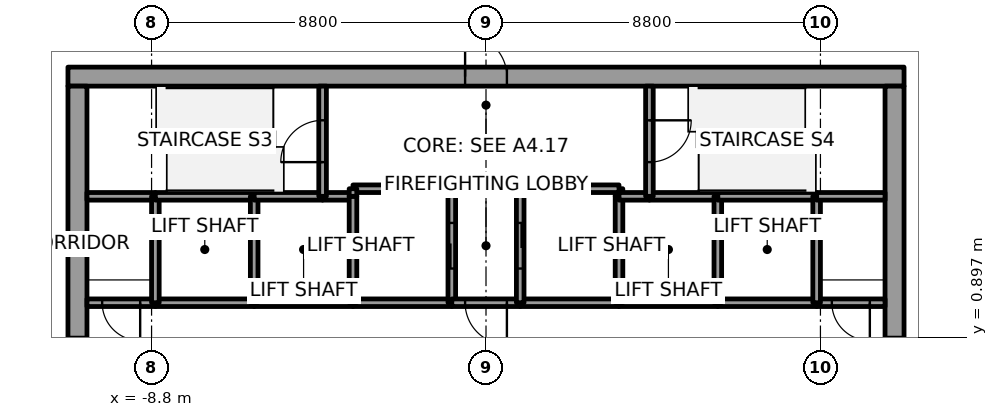
"""IFC4 building model, lengths in metres.
Left out: names, types, materials, properties, quantities, classifications, styles, units other than length and angle.
Written with IfcOpenShell. Run it as: python <this file> out.ifc"""

import sys

from ifc_helpers import new_model, si_unit, direction, frame, frame_2d, origin, place, context, subcontext, project, spatial, rectangle, extrude, element, fill, save


model = new_model("IFC4")
c1 = context("Model", 3, precision=1e-05, world=origin(), true_north=direction((0.0, 1.0)))
c2 = subcontext(c1, "Body", "Model", "MODEL_VIEW")
j1 = project(units=[si_unit("LENGTHUNIT", "METRE"), si_unit("PLANEANGLEUNIT", "RADIAN")], contexts=[c1])
p1 = place(None, origin())
s1 = spatial("IfcSite", under=j1, at=p1, CompositionType="ELEMENT")
p2 = place(p1, origin())
s2 = spatial("IfcBuilding", under=s1, at=p2, CompositionType="ELEMENT")
p3 = place(p2, frame((0.0, 0.0, 77.6)))
s3 = spatial("IfcBuildingStorey", under=s2, at=p3, CompositionType="ELEMENT", Elevation=77.6)
p4 = place(p3, frame((-11.0, 7.75, 0.0), z_axis=(0.0, 0.0, 1.0), x_axis=(1.0, 0.0, 0.0)))
e1 = element("IfcWall", 1, at=p4, inside=s3, PredefinedType="SHEAR", context=c2, shape_type="SweptSolid", body=[
    extrude(rectangle(XDim=22.0, YDim=0.5, at=frame_2d((11.0, 0.0))), origin(), (0.0, 0.0, 1.0), 3.7),
])
p5 = place(p4, frame((10.45, 0.0, 0.0)))
e2 = element("IfcOpeningElement", 2, at=p5, cuts=e1, PredefinedType="OPENING", context=c2, shape_type="SweptSolid", body=[
    extrude(rectangle(XDim=1.1, YDim=2.1, at=frame_2d((0.55, 1.05))), frame((0.0, 0.25, 0.0), z_axis=(0.0, -1.0, 0.0), x_axis=(1.0, 0.0, 0.0)), (0.0, 0.0, 1.0), 0.5),
])
p6 = place(p3, frame((-10.75, -7.5, 0.0), z_axis=(0.0, 0.0, 1.0), x_axis=(0.0, 1.0, 0.0)))
e3 = element("IfcWall", 3, at=p6, inside=s3, PredefinedType="SHEAR", context=c2, shape_type="SweptSolid", body=[
    extrude(rectangle(XDim=15.0, YDim=0.5, at=frame_2d((7.5, 0.0))), origin(), (0.0, 0.0, 1.0), 3.7),
])
p7 = place(p6, frame((6.6, 0.0, 0.0)))
e4 = element("IfcOpeningElement", 4, at=p7, cuts=e3, PredefinedType="OPENING", context=c2, shape_type="SweptSolid", body=[
    extrude(rectangle(XDim=1.8, YDim=2.1, at=frame_2d((0.9, 1.05))), frame((0.0, 0.25, 0.0), z_axis=(0.0, -1.0, 0.0), x_axis=(1.0, 0.0, 0.0)), (0.0, 0.0, 1.0), 0.5),
])
p8 = place(p3, frame((10.75, -7.5, 0.0), z_axis=(0.0, 0.0, 1.0), x_axis=(0.0, 1.0, 0.0)))
e5 = element("IfcWall", 5, at=p8, inside=s3, PredefinedType="SHEAR", context=c2, shape_type="SweptSolid", body=[
    extrude(rectangle(XDim=15.0, YDim=0.5, at=frame_2d((7.5, 0.0))), origin(), (0.0, 0.0, 1.0), 3.7),
])
p9 = place(p8, frame((6.6, 0.0, 0.0)))
e6 = element("IfcOpeningElement", 6, at=p9, cuts=e5, PredefinedType="OPENING", context=c2, shape_type="SweptSolid", body=[
    extrude(rectangle(XDim=1.8, YDim=2.1, at=frame_2d((0.9, 1.05))), frame((0.0, 0.25, 0.0), z_axis=(0.0, -1.0, 0.0), x_axis=(1.0, 0.0, 0.0)), (0.0, 0.0, 1.0), 0.5),
])
p10 = place(p3, frame((-8.7, 1.8, 0.0), z_axis=(0.0, 0.0, 1.0), x_axis=(-1.0, 0.0, 0.0)))
e7 = element("IfcWall", 7, at=p10, inside=s3, PredefinedType="SOLIDWALL", context=c2, shape_type="SweptSolid", body=[
    extrude(rectangle(XDim=1.8, YDim=0.2, at=frame_2d((0.9, 0.0))), origin(), (0.0, 0.0, 1.0), 3.55),
])
p11 = place(p10, frame((0.4, 0.0, 0.0)))
e8 = element("IfcOpeningElement", 8, at=p11, cuts=e7, PredefinedType="OPENING", context=c2, shape_type="SweptSolid", body=[
    extrude(rectangle(XDim=1.0, YDim=2.1, at=frame_2d((0.5, 1.05))), frame((0.0, 0.1, 0.0), z_axis=(0.0, -1.0, 0.0), x_axis=(1.0, 0.0, 0.0)), (0.0, 0.0, 1.0), 0.2),
])
p12 = place(p3, frame((-8.7, 4.6, 0.0), z_axis=(0.0, 0.0, 1.0), x_axis=(-1.0, 0.0, 0.0)))
e9 = element("IfcWall", 9, at=p12, inside=s3, PredefinedType="SOLIDWALL", context=c2, shape_type="SweptSolid", body=[
    extrude(rectangle(XDim=1.8, YDim=0.2, at=frame_2d((0.9, 0.0))), origin(), (0.0, 0.0, 1.0), 3.55),
])
p13 = place(p3, frame((-6.1, 1.8, 0.0), z_axis=(0.0, 0.0, 1.0), x_axis=(-1.0, 0.0, 0.0)))
e10 = element("IfcWall", 10, at=p13, inside=s3, PredefinedType="SOLIDWALL", context=c2, shape_type="SweptSolid", body=[
    extrude(rectangle(XDim=2.6, YDim=0.2, at=frame_2d((1.3, 0.0))), origin(), (0.0, 0.0, 1.0), 3.55),
])
p14 = place(p3, frame((-8.7, 1.8, 0.0), z_axis=(0.0, 0.0, 1.0), x_axis=(0.0, 1.0, 0.0)))
e11 = element("IfcWall", 11, at=p14, inside=s3, PredefinedType="SOLIDWALL", context=c2, shape_type="SweptSolid", body=[
    extrude(rectangle(XDim=2.8, YDim=0.2, at=frame_2d((1.4, 0.0))), origin(), (0.0, 0.0, 1.0), 3.55),
])
p15 = place(p3, frame((-6.1, 4.6, 0.0), z_axis=(0.0, 0.0, 1.0), x_axis=(-1.0, 0.0, 0.0)))
e12 = element("IfcWall", 12, at=p15, inside=s3, PredefinedType="SOLIDWALL", context=c2, shape_type="SweptSolid", body=[
    extrude(rectangle(XDim=2.6, YDim=0.2, at=frame_2d((1.3, 0.0))), origin(), (0.0, 0.0, 1.0), 3.55),
])
p16 = place(p3, frame((-3.5, 1.8, 0.0), z_axis=(0.0, 0.0, 1.0), x_axis=(-1.0, 0.0, 0.0)))
e13 = element("IfcWall", 13, at=p16, inside=s3, PredefinedType="SOLIDWALL", context=c2, shape_type="SweptSolid", body=[
    extrude(rectangle(XDim=2.6, YDim=0.2, at=frame_2d((1.3, 0.0))), origin(), (0.0, 0.0, 1.0), 3.55),
])
p17 = place(p3, frame((-6.1, 1.8, 0.0), z_axis=(0.0, 0.0, 1.0), x_axis=(0.0, 1.0, 0.0)))
e14 = element("IfcWall", 14, at=p17, inside=s3, PredefinedType="SOLIDWALL", context=c2, shape_type="SweptSolid", body=[
    extrude(rectangle(XDim=2.8, YDim=0.2, at=frame_2d((1.4, 0.0))), origin(), (0.0, 0.0, 1.0), 3.55),
])
p18 = place(p3, frame((-4.3, 4.6, 0.0), z_axis=(0.0, 0.0, 1.0), x_axis=(-1.0, 0.0, 0.0)))
e15 = element("IfcWall", 15, at=p18, inside=s3, PredefinedType="SOLIDWALL", context=c2, shape_type="SweptSolid", body=[
    extrude(rectangle(XDim=1.8, YDim=0.2, at=frame_2d((0.9, 0.0))), origin(), (0.0, 0.0, 1.0), 3.55),
])
p19 = place(p3, frame((-3.5, 4.6, 0.0), z_axis=(0.0, 0.0, 1.0), x_axis=(-1.0, 0.0, 0.0)))
e16 = element("IfcWall", 16, at=p19, inside=s3, PredefinedType="SOLIDWALL", context=c2, shape_type="SweptSolid", body=[
    extrude(rectangle(XDim=0.8, YDim=0.2, at=frame_2d((0.4, 0.0))), origin(), (0.0, 0.0, 1.0), 3.55),
])
p20 = place(p3, frame((-4.3, 4.6, 0.0), z_axis=(0.0, 0.0, 1.0), x_axis=(0.0, 1.0, 0.0)))
e17 = element("IfcWall", 17, at=p20, inside=s3, PredefinedType="SOLIDWALL", context=c2, shape_type="SweptSolid", body=[
    extrude(rectangle(XDim=2.9, YDim=0.2, at=frame_2d((1.45, 0.0))), origin(), (0.0, 0.0, 1.0), 3.55),
])
p21 = place(p20, frame((0.9, 0.0, 0.0)))
e18 = element("IfcOpeningElement", 18, at=p21, cuts=e17, PredefinedType="OPENING", context=c2, shape_type="SweptSolid", body=[
    extrude(rectangle(XDim=1.1, YDim=2.1, at=frame_2d((0.55, 1.05))), frame((0.0, 0.1, 0.0), z_axis=(0.0, -1.0, 0.0), x_axis=(1.0, 0.0, 0.0)), (0.0, 0.0, 1.0), 0.2),
])
p22 = place(p3, frame((-0.9, 1.8, 0.0), z_axis=(0.0, 0.0, 1.0), x_axis=(-1.0, 0.0, 0.0)))
e19 = element("IfcWall", 19, at=p22, inside=s3, PredefinedType="SOLIDWALL", context=c2, shape_type="SweptSolid", body=[
    extrude(rectangle(XDim=2.6, YDim=0.2, at=frame_2d((1.3, 0.0))), origin(), (0.0, 0.0, 1.0), 3.55),
])
p23 = place(p3, frame((-3.5, 4.6, 0.0), z_axis=(0.0, 0.0, 1.0), x_axis=(0.0, -1.0, 0.0)))
e20 = element("IfcWall", 20, at=p23, inside=s3, PredefinedType="SOLIDWALL", context=c2, shape_type="SweptSolid", body=[
    extrude(rectangle(XDim=2.8, YDim=0.2, at=frame_2d((1.4, 0.0))), origin(), (0.0, 0.0, 1.0), 3.55),
])
p24 = place(p3, frame((-0.9, 1.8, 0.0), z_axis=(0.0, 0.0, 1.0), x_axis=(0.0, 1.0, 0.0)))
e21 = element("IfcWall", 21, at=p24, inside=s3, PredefinedType="SOLIDWALL", context=c2, shape_type="SweptSolid", body=[
    extrude(rectangle(XDim=3.0, YDim=0.2, at=frame_2d((1.5, 0.0))), origin(), (0.0, 0.0, 1.0), 3.55),
])
p25 = place(p24, frame((0.9, 0.0, 0.0)))
e22 = element("IfcOpeningElement", 22, at=p25, cuts=e21, PredefinedType="OPENING", context=c2, shape_type="SweptSolid", body=[
    extrude(rectangle(XDim=1.2, YDim=2.1, at=frame_2d((0.6, 1.05))), frame((0.0, 0.1, 0.0), z_axis=(0.0, -1.0, 0.0), x_axis=(1.0, 0.0, 0.0)), (0.0, 0.0, 1.0), 0.2),
])
p26 = place(p3, frame((-0.9, 4.8, 0.0), z_axis=(0.0, 0.0, 1.0), x_axis=(-1.0, 0.0, 0.0)))
e23 = element("IfcWall", 23, at=p26, inside=s3, PredefinedType="SOLIDWALL", context=c2, shape_type="SweptSolid", body=[
    extrude(rectangle(XDim=2.6, YDim=0.2, at=frame_2d((1.3, 0.0))), origin(), (0.0, 0.0, 1.0), 3.55),
])
p27 = place(p3, frame((-3.5, 4.8, 0.0), z_axis=(0.0, 0.0, 1.0), x_axis=(0.0, -1.0, 0.0)))
e24 = element("IfcWall", 24, at=p27, inside=s3, PredefinedType="SOLIDWALL", context=c2, shape_type="SweptSolid", body=[
    extrude(rectangle(XDim=0.2, YDim=0.2, at=frame_2d((0.1, 0.0))), origin(), (0.0, 0.0, 1.0), 3.55),
])
p28 = place(p3, frame((0.9, 1.8, 0.0), z_axis=(0.0, 0.0, 1.0), x_axis=(-1.0, 0.0, 0.0)))
e25 = element("IfcWall", 25, at=p28, inside=s3, PredefinedType="SOLIDWALL", context=c2, shape_type="SweptSolid", body=[
    extrude(rectangle(XDim=1.8, YDim=0.2, at=frame_2d((0.9, 0.0))), origin(), (0.0, 0.0, 1.0), 3.55),
])
p29 = place(p28, frame((0.35, 0.0, 0.0)))
e26 = element("IfcOpeningElement", 26, at=p29, cuts=e25, PredefinedType="OPENING", context=c2, shape_type="SweptSolid", body=[
    extrude(rectangle(XDim=1.1, YDim=2.1, at=frame_2d((0.55, 1.05))), frame((0.0, 0.1, 0.0), z_axis=(0.0, -1.0, 0.0), x_axis=(1.0, 0.0, 0.0)), (0.0, 0.0, 1.0), 0.2),
])
p30 = place(p3, frame((3.5, 1.8, 0.0), z_axis=(0.0, 0.0, 1.0), x_axis=(-1.0, 0.0, 0.0)))
e27 = element("IfcWall", 27, at=p30, inside=s3, PredefinedType="SOLIDWALL", context=c2, shape_type="SweptSolid", body=[
    extrude(rectangle(XDim=2.6, YDim=0.2, at=frame_2d((1.3, 0.0))), origin(), (0.0, 0.0, 1.0), 3.55),
])
p31 = place(p3, frame((3.5, 4.6, 0.0), z_axis=(0.0, 0.0, 1.0), x_axis=(0.0, 1.0, 0.0)))
e28 = element("IfcWall", 28, at=p31, inside=s3, PredefinedType="SOLIDWALL", context=c2, shape_type="SweptSolid", body=[
    extrude(rectangle(XDim=0.2, YDim=0.2, at=frame_2d((0.1, 0.0))), origin(), (0.0, 0.0, 1.0), 3.55),
])
p32 = place(p3, frame((3.5, 4.8, 0.0), z_axis=(0.0, 0.0, 1.0), x_axis=(-1.0, 0.0, 0.0)))
e29 = element("IfcWall", 29, at=p32, inside=s3, PredefinedType="SOLIDWALL", context=c2, shape_type="SweptSolid", body=[
    extrude(rectangle(XDim=2.6, YDim=0.2, at=frame_2d((1.3, 0.0))), origin(), (0.0, 0.0, 1.0), 3.55),
])
p33 = place(p3, frame((0.9, 4.8, 0.0), z_axis=(0.0, 0.0, 1.0), x_axis=(0.0, -1.0, 0.0)))
e30 = element("IfcWall", 30, at=p33, inside=s3, PredefinedType="SOLIDWALL", context=c2, shape_type="SweptSolid", body=[
    extrude(rectangle(XDim=3.0, YDim=0.2, at=frame_2d((1.5, 0.0))), origin(), (0.0, 0.0, 1.0), 3.55),
])
p34 = place(p33, frame((0.9, 0.0, 0.0)))
e31 = element("IfcOpeningElement", 31, at=p34, cuts=e30, PredefinedType="OPENING", context=c2, shape_type="SweptSolid", body=[
    extrude(rectangle(XDim=1.2, YDim=2.1, at=frame_2d((0.6, 1.05))), frame((0.0, 0.1, 0.0), z_axis=(0.0, -1.0, 0.0), x_axis=(1.0, 0.0, 0.0)), (0.0, 0.0, 1.0), 0.2),
])
p35 = place(p3, frame((6.1, 1.8, 0.0), z_axis=(0.0, 0.0, 1.0), x_axis=(-1.0, 0.0, 0.0)))
e32 = element("IfcWall", 32, at=p35, inside=s3, PredefinedType="SOLIDWALL", context=c2, shape_type="SweptSolid", body=[
    extrude(rectangle(XDim=2.6, YDim=0.2, at=frame_2d((1.3, 0.0))), origin(), (0.0, 0.0, 1.0), 3.55),
])
p36 = place(p3, frame((3.5, 1.8, 0.0), z_axis=(0.0, 0.0, 1.0), x_axis=(0.0, 1.0, 0.0)))
e33 = element("IfcWall", 33, at=p36, inside=s3, PredefinedType="SOLIDWALL", context=c2, shape_type="SweptSolid", body=[
    extrude(rectangle(XDim=2.8, YDim=0.2, at=frame_2d((1.4, 0.0))), origin(), (0.0, 0.0, 1.0), 3.55),
])
p37 = place(p3, frame((4.3, 4.6, 0.0), z_axis=(0.0, 0.0, 1.0), x_axis=(-1.0, 0.0, 0.0)))
e34 = element("IfcWall", 34, at=p37, inside=s3, PredefinedType="SOLIDWALL", context=c2, shape_type="SweptSolid", body=[
    extrude(rectangle(XDim=0.8, YDim=0.2, at=frame_2d((0.4, 0.0))), origin(), (0.0, 0.0, 1.0), 3.55),
])
p38 = place(p3, frame((6.1, 4.6, 0.0), z_axis=(0.0, 0.0, 1.0), x_axis=(-1.0, 0.0, 0.0)))
e35 = element("IfcWall", 35, at=p38, inside=s3, PredefinedType="SOLIDWALL", context=c2, shape_type="SweptSolid", body=[
    extrude(rectangle(XDim=1.8, YDim=0.2, at=frame_2d((0.9, 0.0))), origin(), (0.0, 0.0, 1.0), 3.55),
])
p39 = place(p3, frame((4.3, 7.5, 0.0), z_axis=(0.0, 0.0, 1.0), x_axis=(0.0, -1.0, 0.0)))
e36 = element("IfcWall", 36, at=p39, inside=s3, PredefinedType="SOLIDWALL", context=c2, shape_type="SweptSolid", body=[
    extrude(rectangle(XDim=2.9, YDim=0.2, at=frame_2d((1.45, 0.0))), origin(), (0.0, 0.0, 1.0), 3.55),
])
p40 = place(p39, frame((0.9, 0.0, 0.0)))
e37 = element("IfcOpeningElement", 37, at=p40, cuts=e36, PredefinedType="OPENING", context=c2, shape_type="SweptSolid", body=[
    extrude(rectangle(XDim=1.1, YDim=2.1, at=frame_2d((0.55, 1.05))), frame((0.0, 0.1, 0.0), z_axis=(0.0, -1.0, 0.0), x_axis=(1.0, 0.0, 0.0)), (0.0, 0.0, 1.0), 0.2),
])
p41 = place(p3, frame((8.7, 1.8, 0.0), z_axis=(0.0, 0.0, 1.0), x_axis=(-1.0, 0.0, 0.0)))
e38 = element("IfcWall", 38, at=p41, inside=s3, PredefinedType="SOLIDWALL", context=c2, shape_type="SweptSolid", body=[
    extrude(rectangle(XDim=2.6, YDim=0.2, at=frame_2d((1.3, 0.0))), origin(), (0.0, 0.0, 1.0), 3.55),
])
p42 = place(p3, frame((6.1, 1.8, 0.0), z_axis=(0.0, 0.0, 1.0), x_axis=(0.0, 1.0, 0.0)))
e39 = element("IfcWall", 39, at=p42, inside=s3, PredefinedType="SOLIDWALL", context=c2, shape_type="SweptSolid", body=[
    extrude(rectangle(XDim=2.8, YDim=0.2, at=frame_2d((1.4, 0.0))), origin(), (0.0, 0.0, 1.0), 3.55),
])
p43 = place(p3, frame((8.7, 4.6, 0.0), z_axis=(0.0, 0.0, 1.0), x_axis=(-1.0, 0.0, 0.0)))
e40 = element("IfcWall", 40, at=p43, inside=s3, PredefinedType="SOLIDWALL", context=c2, shape_type="SweptSolid", body=[
    extrude(rectangle(XDim=2.6, YDim=0.2, at=frame_2d((1.3, 0.0))), origin(), (0.0, 0.0, 1.0), 3.55),
])
p44 = place(p3, frame((10.5, 1.8, 0.0), z_axis=(0.0, 0.0, 1.0), x_axis=(-1.0, 0.0, 0.0)))
e41 = element("IfcWall", 41, at=p44, inside=s3, PredefinedType="SOLIDWALL", context=c2, shape_type="SweptSolid", body=[
    extrude(rectangle(XDim=1.8, YDim=0.2, at=frame_2d((0.9, 0.0))), origin(), (0.0, 0.0, 1.0), 3.55),
])
p45 = place(p44, frame((0.4, 0.0, 0.0)))
e42 = element("IfcOpeningElement", 42, at=p45, cuts=e41, PredefinedType="OPENING", context=c2, shape_type="SweptSolid", body=[
    extrude(rectangle(XDim=1.0, YDim=2.1, at=frame_2d((0.5, 1.05))), frame((0.0, 0.1, 0.0), z_axis=(0.0, -1.0, 0.0), x_axis=(1.0, 0.0, 0.0)), (0.0, 0.0, 1.0), 0.2),
])
p46 = place(p3, frame((8.7, 4.6, 0.0), z_axis=(0.0, 0.0, 1.0), x_axis=(0.0, -1.0, 0.0)))
e43 = element("IfcWall", 43, at=p46, inside=s3, PredefinedType="SOLIDWALL", context=c2, shape_type="SweptSolid", body=[
    extrude(rectangle(XDim=2.8, YDim=0.2, at=frame_2d((1.4, 0.0))), origin(), (0.0, 0.0, 1.0), 3.55),
])
p47 = place(p3, frame((10.5, 4.6, 0.0), z_axis=(0.0, 0.0, 1.0), x_axis=(-1.0, 0.0, 0.0)))
e44 = element("IfcWall", 44, at=p47, inside=s3, PredefinedType="SOLIDWALL", context=c2, shape_type="SweptSolid", body=[
    extrude(rectangle(XDim=1.8, YDim=0.2, at=frame_2d((0.9, 0.0))), origin(), (0.0, 0.0, 1.0), 3.55),
])
p48 = place(p25, origin())
e45 = element("IfcDoor", 45, at=p48, inside=s3, OperationType="SLIDING_TO_LEFT", PredefinedType="DOOR", context=c2, shape_type="SweptSolid", body=[
    extrude(rectangle(XDim=1.2, YDim=2.1, at=frame_2d((0.6, 1.05))), frame((0.0, 0.025, 0.0), z_axis=(0.0, -1.0, 0.0), x_axis=(1.0, 0.0, 0.0)), (0.0, 0.0, 1.0), 0.05),
])
fill(e22, e45)
p49 = place(p34, origin())
e46 = element("IfcDoor", 46, at=p49, inside=s3, OperationType="SLIDING_TO_LEFT", PredefinedType="DOOR", context=c2, shape_type="SweptSolid", body=[
    extrude(rectangle(XDim=1.2, YDim=2.1, at=frame_2d((0.6, 1.05))), frame((0.0, 0.025, 0.0), z_axis=(0.0, -1.0, 0.0), x_axis=(1.0, 0.0, 0.0)), (0.0, 0.0, 1.0), 0.05),
])
fill(e31, e46)
p50 = place(p29, origin())
e47 = element("IfcDoor", 47, at=p50, inside=s3, OperationType="SINGLE_SWING_LEFT", PredefinedType="DOOR", context=c2, shape_type="SweptSolid", body=[
    extrude(rectangle(XDim=1.1, YDim=2.1, at=frame_2d((0.55, 1.05))), frame((0.0, 0.025, 0.0), z_axis=(0.0, -1.0, 0.0), x_axis=(1.0, 0.0, 0.0)), (0.0, 0.0, 1.0), 0.05),
])
fill(e26, e47)
p51 = place(p11, origin())
e48 = element("IfcDoor", 48, at=p51, inside=s3, OperationType="SINGLE_SWING_RIGHT", PredefinedType="DOOR", context=c2, shape_type="SweptSolid", body=[
    extrude(rectangle(XDim=1.0, YDim=2.1, at=frame_2d((0.5, 1.05))), frame((0.0, 0.025, 0.0), z_axis=(0.0, -1.0, 0.0), x_axis=(1.0, 0.0, 0.0)), (0.0, 0.0, 1.0), 0.05),
])
fill(e8, e48)
p52 = place(p45, origin())
e49 = element("IfcDoor", 49, at=p52, inside=s3, OperationType="SINGLE_SWING_LEFT", PredefinedType="DOOR", context=c2, shape_type="SweptSolid", body=[
    extrude(rectangle(XDim=1.0, YDim=2.1, at=frame_2d((0.5, 1.05))), frame((0.0, 0.025, 0.0), z_axis=(0.0, -1.0, 0.0), x_axis=(1.0, 0.0, 0.0)), (0.0, 0.0, 1.0), 0.05),
])
fill(e42, e49)
p53 = place(p21, origin())
e50 = element("IfcDoor", 50, at=p53, inside=s3, OperationType="SINGLE_SWING_LEFT", PredefinedType="DOOR", context=c2, shape_type="SweptSolid", body=[
    extrude(rectangle(XDim=1.1, YDim=2.1, at=frame_2d((0.55, 1.05))), frame((0.0, 0.025, 0.0), z_axis=(0.0, -1.0, 0.0), x_axis=(1.0, 0.0, 0.0)), (0.0, 0.0, 1.0), 0.05),
])
fill(e18, e50)
p54 = place(p40, origin())
e51 = element("IfcDoor", 51, at=p54, inside=s3, OperationType="SINGLE_SWING_RIGHT", PredefinedType="DOOR", context=c2, shape_type="SweptSolid", body=[
    extrude(rectangle(XDim=1.1, YDim=2.1, at=frame_2d((0.55, 1.05))), frame((0.0, 0.025, 0.0), z_axis=(0.0, -1.0, 0.0), x_axis=(1.0, 0.0, 0.0)), (0.0, 0.0, 1.0), 0.05),
])
fill(e37, e51)
p55 = place(p7, origin())
e52 = element("IfcDoor", 52, at=p55, inside=s3, OperationType="DOUBLE_DOOR_SINGLE_SWING", PredefinedType="DOOR", context=c2, shape_type="SweptSolid", body=[
    extrude(rectangle(XDim=1.8, YDim=2.1, at=frame_2d((0.9, 1.05))), frame((0.0, 0.025, 0.0), z_axis=(0.0, -1.0, 0.0), x_axis=(1.0, 0.0, 0.0)), (0.0, 0.0, 1.0), 0.05),
])
fill(e4, e52)
p56 = place(p9, origin())
e53 = element("IfcDoor", 53, at=p56, inside=s3, OperationType="DOUBLE_DOOR_SINGLE_SWING", PredefinedType="DOOR", context=c2, shape_type="SweptSolid", body=[
    extrude(rectangle(XDim=1.8, YDim=2.1, at=frame_2d((0.9, 1.05))), frame((0.0, 0.025, 0.0), z_axis=(0.0, -1.0, 0.0), x_axis=(1.0, 0.0, 0.0)), (0.0, 0.0, 1.0), 0.05),
])
fill(e6, e53)
p57 = place(p5, origin())
e54 = element("IfcDoor", 54, at=p57, inside=s3, OperationType="SINGLE_SWING_RIGHT", PredefinedType="DOOR", context=c2, shape_type="SweptSolid", body=[
    extrude(rectangle(XDim=1.1, YDim=2.1, at=frame_2d((0.55, 1.05))), frame((0.0, 0.025, 0.0), z_axis=(0.0, -1.0, 0.0), x_axis=(1.0, 0.0, 0.0)), (0.0, 0.0, 1.0), 0.05),
])
fill(e2, e54)
save(model, sys.argv[1])
